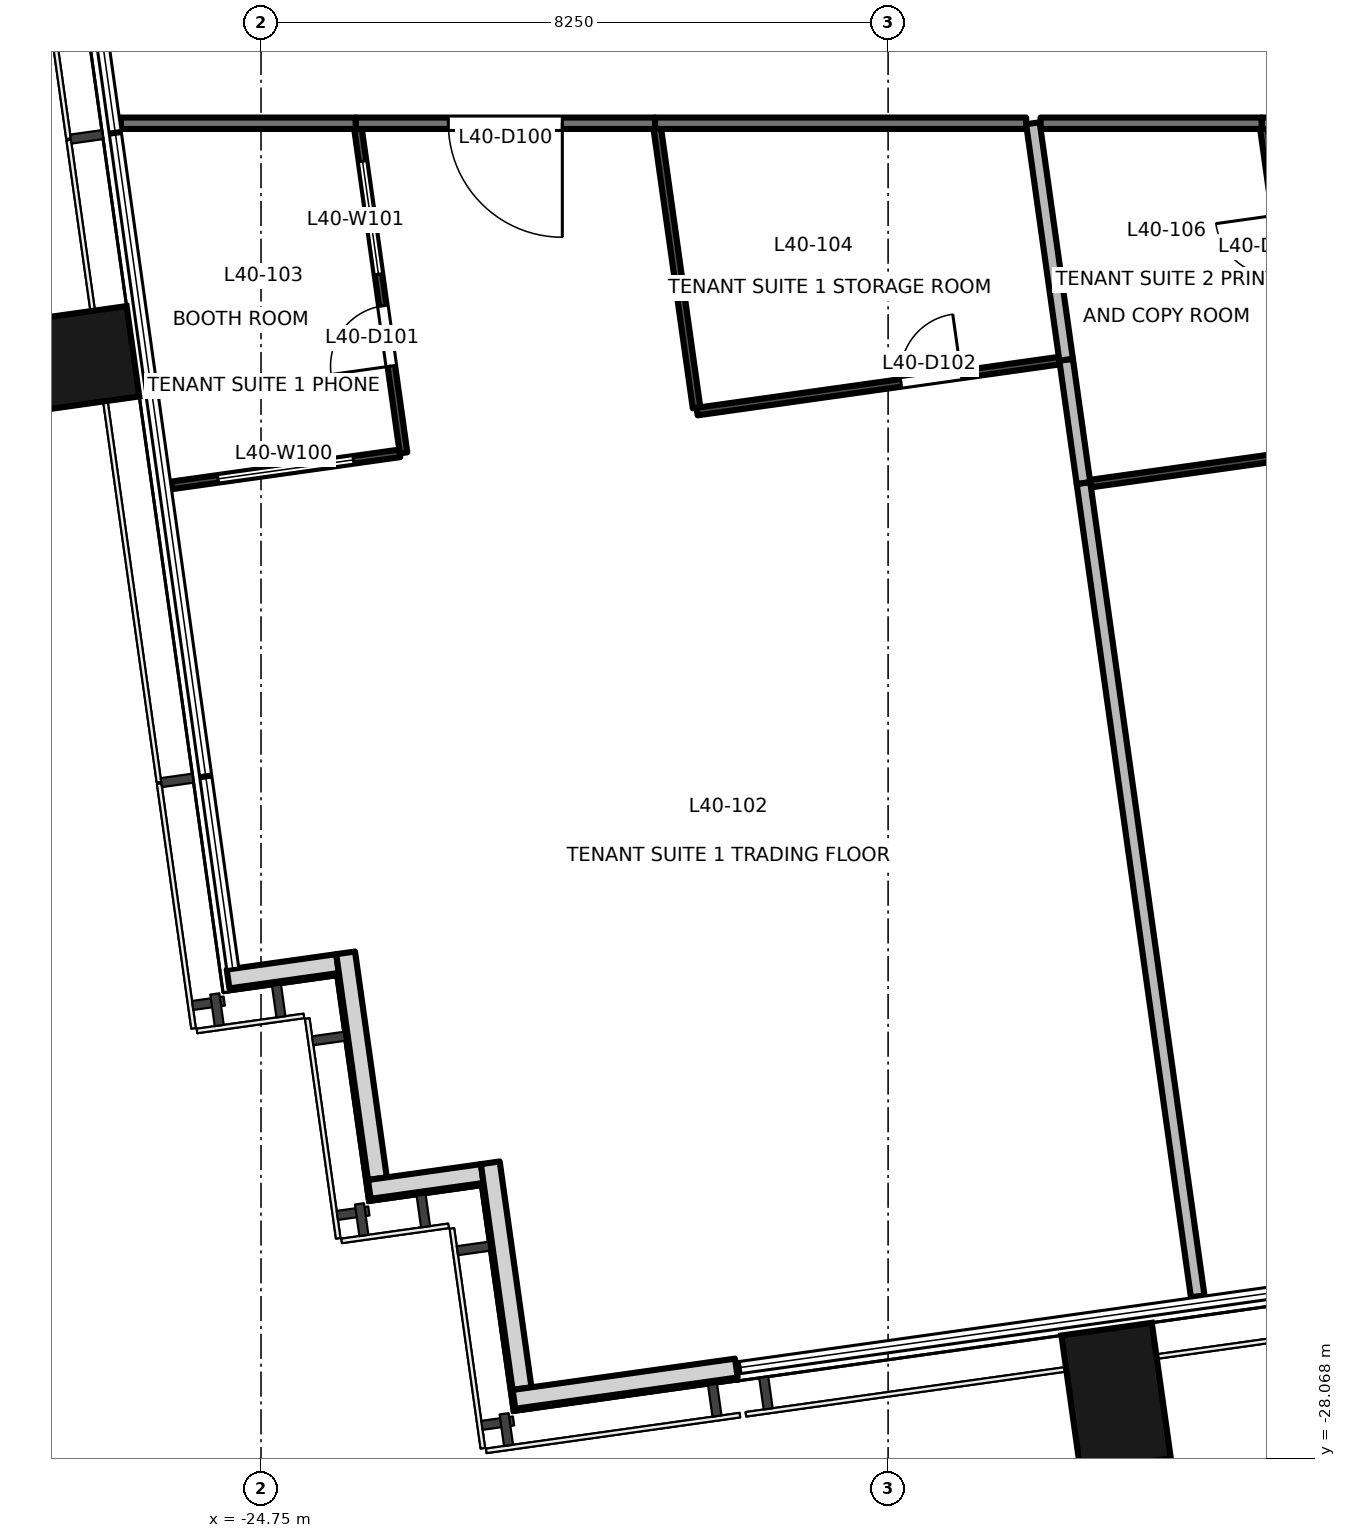
"""IFC4 building model, lengths in metres.
Left out: names, types, materials, properties, quantities, classifications, styles, units other than length and angle.
Written with IfcOpenShell. Run it as: python <this file> out.ifc"""

import sys

from ifc_helpers import new_model, si_unit, direction, frame, frame_2d, origin, origin_2d, place, context, subcontext, project, spatial, rectangle, extrude, element, fill, save


model = new_model("IFC4")
c1 = context("Model", 3, precision=1e-05, world=origin(), true_north=direction((0.0, 1.0)))
c2 = subcontext(c1, "Body", "Model", "MODEL_VIEW")
j1 = project(units=[si_unit("LENGTHUNIT", "METRE"), si_unit("PLANEANGLEUNIT", "RADIAN")], contexts=[c1])
p1 = place(None, origin())
s1 = spatial("IfcSite", under=j1, at=p1, CompositionType="ELEMENT")
p2 = place(p1, origin())
s2 = spatial("IfcBuilding", under=s1, at=p2, CompositionType="ELEMENT")
p3 = place(p2, frame((0.0, 0.0, 176.3)))
s3 = spatial("IfcBuildingStorey", under=s2, at=p3, CompositionType="ELEMENT", Elevation=176.3)
for number, where, z_axis, x_axis in (
    (1, (-13.5, -27.256, -0.2), (0.0, 0.0, 1.0), (0.99, 0.139, 0.0)),
    (2, (-27.326, -13.625, -0.2), (0.0, 0.0, 1.0), (-0.139, 0.99, 0.0)),
):
    element("IfcColumn", number, at=place(p3, frame(where, z_axis=z_axis, x_axis=x_axis)), inside=s3, PredefinedType="COLUMN", context=c2, shape_type="SweptSolid", body=[
        extrude(rectangle(XDim=1.2, YDim=1.8, at=origin_2d()), origin(), (0.0, 0.0, 1.0), 3.9),
    ])
p4 = place(p3, frame((-25.184, -21.758, 0.0), z_axis=(0.0, 0.0, 1.0), x_axis=(0.9902493448, 0.13930626376, 0.0)))
e3 = element("IfcWall", 3, at=p4, inside=s3, PredefinedType="SOLIDWALL", context=c2, shape_type="SweptSolid", body=[
    extrude(rectangle(XDim=1.455, YDim=0.25, at=frame_2d((0.727, 0.0))), origin(), (0.0, 0.0, 1.0), 3.7),
])
p5 = place(p3, frame((-23.637, -21.414, 0.0), z_axis=(0.0, 0.0, 1.0), x_axis=(0.139313431826, -0.990248336385, 0.0)))
e4 = element("IfcWall", 4, at=p5, inside=s3, PredefinedType="SOLIDWALL", context=c2, shape_type="SweptSolid", body=[
    extrude(rectangle(XDim=3.0, YDim=0.25, at=frame_2d((1.5, 0.0))), origin(), (0.0, 0.0, 1.0), 3.7),
])
p6 = place(p3, frame((-23.325, -24.526, 0.0), z_axis=(0.0, 0.0, 1.0), x_axis=(0.990243596651, 0.13934711799, 0.0)))
e5 = element("IfcWall", 5, at=p6, inside=s3, PredefinedType="SOLIDWALL", context=c2, shape_type="SweptSolid", body=[
    extrude(rectangle(XDim=1.5, YDim=0.25, at=frame_2d((0.75, 0.0))), origin(), (0.0, 0.0, 1.0), 3.7),
])
p7 = place(p3, frame((-21.734, -24.176, 0.0), z_axis=(0.0, 0.0, 1.0), x_axis=(0.139313431826, -0.990248336385, 0.0)))
e6 = element("IfcWall", 6, at=p7, inside=s3, PredefinedType="SOLIDWALL", context=c2, shape_type="SweptSolid", body=[
    extrude(rectangle(XDim=3.0, YDim=0.25, at=frame_2d((1.5, 0.0))), origin(), (0.0, 0.0, 1.0), 3.7),
])
p8 = place(p3, frame((-21.422, -27.288, 0.0), z_axis=(0.0, 0.0, 1.0), x_axis=(0.990246427036, 0.139327002919, 0.0)))
e7 = element("IfcWall", 7, at=p8, inside=s3, PredefinedType="SOLIDWALL", context=c2, shape_type="SweptSolid", body=[
    extrude(rectangle(XDim=2.954, YDim=0.25, at=frame_2d((1.477, 0.0))), origin(), (0.0, 0.0, 1.0), 3.7),
])
p9 = place(p3, frame((-19.566, -10.5, 0.0), z_axis=(0.0, 0.0, 1.0), x_axis=(-1.0, 0.0, 0.0)))
e8 = element("IfcWall", 8, at=p9, inside=s3, PredefinedType="PARTITIONING", context=c2, shape_type="SweptSolid", body=[
    extrude(rectangle(XDim=3.939, YDim=0.15, at=frame_2d((1.969, 0.0))), origin(), (0.0, 0.0, 1.0), 3.7),
])
p10 = place(p9, frame((1.22, 0.0, 0.0)))
e9 = element("IfcOpeningElement", 9, at=p10, cuts=e8, PredefinedType="OPENING", context=c2, shape_type="SweptSolid", body=[
    extrude(rectangle(XDim=1.5, YDim=2.1, at=frame_2d((0.75, 1.05))), frame((0.0, 0.085, 0.0), z_axis=(0.0, -1.0, 0.0), x_axis=(1.0, 0.0, 0.0)), (0.0, 0.0, 1.0), 0.171),
])
p11 = place(p3, frame((-23.505, -10.5, 0.0), z_axis=(0.0, 0.0, 1.0), x_axis=(-1.0, 0.0, 0.0)))
e10 = element("IfcWall", 10, at=p11, inside=s3, PredefinedType="PARTITIONING", context=c2, shape_type="SweptSolid", body=[
    extrude(rectangle(XDim=3.089, YDim=0.15, at=frame_2d((1.544, 0.0))), origin(), (0.0, 0.0, 1.0), 3.7),
])
p12 = place(p3, frame((-14.684, -10.5, 0.0), z_axis=(0.0, 0.0, 1.0), x_axis=(-1.0, 0.0, 0.0)))
e11 = element("IfcWall", 11, at=p12, inside=s3, PredefinedType="PARTITIONING", context=c2, shape_type="SweptSolid", body=[
    extrude(rectangle(XDim=4.882, YDim=0.15, at=frame_2d((2.441, 0.0))), origin(), (0.0, 0.0, 1.0), 3.7),
])
p13 = place(p3, frame((-7.648, -10.5, 0.0), z_axis=(0.0, 0.0, 1.0), x_axis=(-1.0, 0.0, 0.0)))
e12 = element("IfcWall", 12, at=p13, inside=s3, PredefinedType="PARTITIONING", context=c2, shape_type="SweptSolid", body=[
    extrude(rectangle(XDim=3.938, YDim=0.15, at=frame_2d((1.969, 0.0))), origin(), (0.0, 0.0, 1.0), 2.8),
])
p14 = place(p3, frame((-11.586, -10.5, 0.0), z_axis=(0.0, 0.0, 1.0), x_axis=(-1.0, 0.0, 0.0)))
e13 = element("IfcWall", 13, at=p14, inside=s3, PredefinedType="PARTITIONING", context=c2, shape_type="SweptSolid", body=[
    extrude(rectangle(XDim=2.908, YDim=0.15, at=frame_2d((1.454, 0.0))), origin(), (0.0, 0.0, 1.0), 2.8),
])
p15 = place(p3, frame((-25.925, -15.264, 0.0), z_axis=(0.0, 0.0, 1.0), x_axis=(0.990300981683, 0.138938711948, 0.0)))
e14 = element("IfcWall", 14, at=p15, inside=s3, PredefinedType="PARTITIONING", context=c2, shape_type="SweptSolid", body=[
    extrude(rectangle(XDim=3.029, YDim=0.1, at=frame_2d((1.515, 0.0))), origin(), (0.0, 0.0, 1.0), 3.7),
])
p16 = place(p15, frame((0.615, 0.0, 0.9)))
e15 = element("IfcOpeningElement", 15, at=p16, cuts=e14, PredefinedType="OPENING", context=c2, shape_type="SweptSolid", body=[
    extrude(rectangle(XDim=1.8, YDim=1.2, at=frame_2d((0.9, 0.6))), frame((0.0, 0.061, 0.0), z_axis=(0.0, -1.0, 0.0), x_axis=(1.0, 0.0, 0.0)), (0.0, 0.0, 1.0), 0.121),
])
p17 = place(p3, frame((-22.875, -14.836, 0.0), z_axis=(0.0, 0.0, 1.0), x_axis=(-0.139240076126, 0.990258653686, 0.0)))
e16 = element("IfcWall", 16, at=p17, inside=s3, PredefinedType="PARTITIONING", context=c2, shape_type="SweptSolid", body=[
    extrude(rectangle(XDim=4.31, YDim=0.1, at=frame_2d((2.155, 0.0))), origin(), (0.0, 0.0, 1.0), 3.7),
])
p18 = place(p17, frame((1.153, 0.0, 0.0)))
e17 = element("IfcOpeningElement", 17, at=p18, cuts=e16, PredefinedType="OPENING", context=c2, shape_type="SweptSolid", body=[
    extrude(rectangle(XDim=0.8, YDim=2.1, at=frame_2d((0.4, 1.05))), frame((0.0, 0.061, 0.0), z_axis=(0.0, -1.0, 0.0), x_axis=(1.0, 0.0, 0.0)), (0.0, 0.0, 1.0), 0.121),
])
p19 = place(p17, frame((2.373, 0.0, 0.9)))
e18 = element("IfcOpeningElement", 18, at=p19, cuts=e16, PredefinedType="OPENING", context=c2, shape_type="SweptSolid", body=[
    extrude(rectangle(XDim=1.5, YDim=1.2, at=frame_2d((0.75, 0.6))), frame((0.0, 0.061, 0.0), z_axis=(0.0, -1.0, 0.0), x_axis=(1.0, 0.0, 0.0)), (0.0, 0.0, 1.0), 0.121),
])
p20 = place(p3, frame((-19.537, -10.568, 0.0), z_axis=(0.0, 0.0, 1.0), x_axis=(0.139303202992, -0.990249775378, 0.0)))
e19 = element("IfcWall", 19, at=p20, inside=s3, PredefinedType="PARTITIONING", context=c2, shape_type="SweptSolid", body=[
    extrude(rectangle(XDim=3.712, YDim=0.1, at=frame_2d((1.856, 0.0))), origin(), (0.0, 0.0, 1.0), 3.7),
])
p21 = place(p3, frame((-19.013, -14.293, 0.0), z_axis=(0.0, 0.0, 1.0), x_axis=(0.990264556242, 0.139198091406, 0.0)))
e20 = element("IfcWall", 20, at=p21, inside=s3, PredefinedType="PARTITIONING", context=c2, shape_type="SweptSolid", body=[
    extrude(rectangle(XDim=4.813, YDim=0.1, at=frame_2d((2.406, 0.0))), origin(), (0.0, 0.0, 1.0), 3.7),
])
p22 = place(p21, frame((2.709, 0.0, 0.0)))
e21 = element("IfcOpeningElement", 21, at=p22, cuts=e20, PredefinedType="OPENING", context=c2, shape_type="SweptSolid", body=[
    extrude(rectangle(XDim=0.8, YDim=2.1, at=frame_2d((0.4, 1.05))), frame((0.0, 0.061, 0.0), z_axis=(0.0, -1.0, 0.0), x_axis=(1.0, 0.0, 0.0)), (0.0, 0.0, 1.0), 0.121),
])
p23 = place(p3, frame((-13.93, -15.233, 0.0), z_axis=(0.0, 0.0, 1.0), x_axis=(0.139092809985, -0.990279349583, 0.0)))
e22 = element("IfcWall", 22, at=p23, inside=s3, PredefinedType="PARTITIONING", context=c2, shape_type="SweptSolid", body=[
    extrude(rectangle(XDim=10.805, YDim=0.18, at=frame_2d((5.403, 0.0))), origin(), (0.0, 0.0, 1.0), 2.8),
])
p24 = place(p3, frame((-14.158, -13.611, 0.0), z_axis=(0.0, 0.0, 1.0), x_axis=(0.139229707098, -0.990260111618, 0.0)))
e23 = element("IfcWall", 23, at=p24, inside=s3, PredefinedType="PARTITIONING", context=c2, shape_type="SweptSolid", body=[
    extrude(rectangle(XDim=1.638, YDim=0.18, at=frame_2d((0.819, 0.0))), origin(), (0.0, 0.0, 1.0), 3.7),
])
p25 = place(p3, frame((-14.595, -10.5, 0.0), z_axis=(0.0, 0.0, 1.0), x_axis=(0.139103611391, -0.990277832377, 0.0)))
e24 = element("IfcWall", 24, at=p25, inside=s3, PredefinedType="PARTITIONING", context=c2, shape_type="SweptSolid", body=[
    extrude(rectangle(XDim=3.142, YDim=0.18, at=frame_2d((1.571, 0.0))), origin(), (0.0, 0.0, 1.0), 3.7),
])
p26 = place(p3, frame((-13.838, -15.241, 0.0), z_axis=(0.0, 0.0, 1.0), x_axis=(0.990263018372, 0.139209031475, 0.0)))
e25 = element("IfcWall", 25, at=p26, inside=s3, PredefinedType="PARTITIONING", context=c2, shape_type="SweptSolid", body=[
    extrude(rectangle(XDim=2.859, YDim=0.1, at=frame_2d((1.429, 0.0))), origin(), (0.0, 0.0, 1.0), 2.8),
])
p27 = place(p3, frame((-10.957, -14.836, 0.0), z_axis=(0.0, 0.0, 1.0), x_axis=(-0.138962312518, 0.990297670249, 0.0)))
e26 = element("IfcWall", 26, at=p27, inside=s3, PredefinedType="PARTITIONING", context=c2, shape_type="SweptSolid", body=[
    extrude(rectangle(XDim=4.31, YDim=0.1, at=frame_2d((2.155, 0.0))), origin(), (0.0, 0.0, 1.0), 3.7),
])
p28 = place(p27, frame((2.357, 0.0, 0.0)))
e27 = element("IfcOpeningElement", 27, at=p28, cuts=e26, PredefinedType="OPENING", context=c2, shape_type="SweptSolid", body=[
    extrude(rectangle(XDim=0.8, YDim=2.1, at=frame_2d((0.4, 1.05))), frame((0.0, 0.061, 0.0), z_axis=(0.0, -1.0, 0.0), x_axis=(1.0, 0.0, 0.0)), (0.0, 0.0, 1.0), 0.121),
])
p29 = place(p10, origin())
e28 = element("IfcDoor", 28, at=p29, inside=s3, OperationType="DOUBLE_DOOR_SINGLE_SWING", PredefinedType="DOOR", context=c2, shape_type="SweptSolid", body=[
    extrude(rectangle(XDim=1.5, YDim=2.1, at=frame_2d((0.75, 1.05))), frame((0.0, 0.025, 0.0), z_axis=(0.0, -1.0, 0.0), x_axis=(1.0, 0.0, 0.0)), (0.0, 0.0, 1.0), 0.05),
])
fill(e9, e28)
p30 = place(p18, origin())
e29 = element("IfcDoor", 29, at=p30, inside=s3, OperationType="SINGLE_SWING_LEFT", PredefinedType="DOOR", context=c2, shape_type="SweptSolid", body=[
    extrude(rectangle(XDim=0.8, YDim=2.1, at=frame_2d((0.4, 1.05))), frame((0.0, 0.025, 0.0), z_axis=(0.0, -1.0, 0.0), x_axis=(1.0, 0.0, 0.0)), (0.0, 0.0, 1.0), 0.05),
])
fill(e17, e29)
p31 = place(p22, origin())
e30 = element("IfcDoor", 30, at=p31, inside=s3, OperationType="SINGLE_SWING_RIGHT", PredefinedType="DOOR", context=c2, shape_type="SweptSolid", body=[
    extrude(rectangle(XDim=0.8, YDim=2.1, at=frame_2d((0.4, 1.05))), frame((0.0, 0.025, 0.0), z_axis=(0.0, -1.0, 0.0), x_axis=(1.0, 0.0, 0.0)), (0.0, 0.0, 1.0), 0.05),
])
fill(e21, e30)
p32 = place(p16, origin())
e31 = element("IfcWindow", 31, at=p32, inside=s3, PartitioningType="SINGLE_PANEL", PredefinedType="WINDOW", context=c2, shape_type="SweptSolid", body=[
    extrude(rectangle(XDim=1.8, YDim=1.2, at=frame_2d((0.9, 0.6))), frame((0.0, 0.03, 0.0), z_axis=(0.0, -1.0, 0.0), x_axis=(1.0, 0.0, 0.0)), (0.0, 0.0, 1.0), 0.06),
])
fill(e15, e31)
p33 = place(p19, origin())
e32 = element("IfcWindow", 32, at=p33, inside=s3, PartitioningType="SINGLE_PANEL", PredefinedType="WINDOW", context=c2, shape_type="SweptSolid", body=[
    extrude(rectangle(XDim=1.5, YDim=1.2, at=frame_2d((0.75, 0.6))), frame((0.0, 0.03, 0.0), z_axis=(0.0, -1.0, 0.0), x_axis=(1.0, 0.0, 0.0)), (0.0, 0.0, 1.0), 0.06),
])
fill(e18, e32)
save(model, sys.argv[1])
